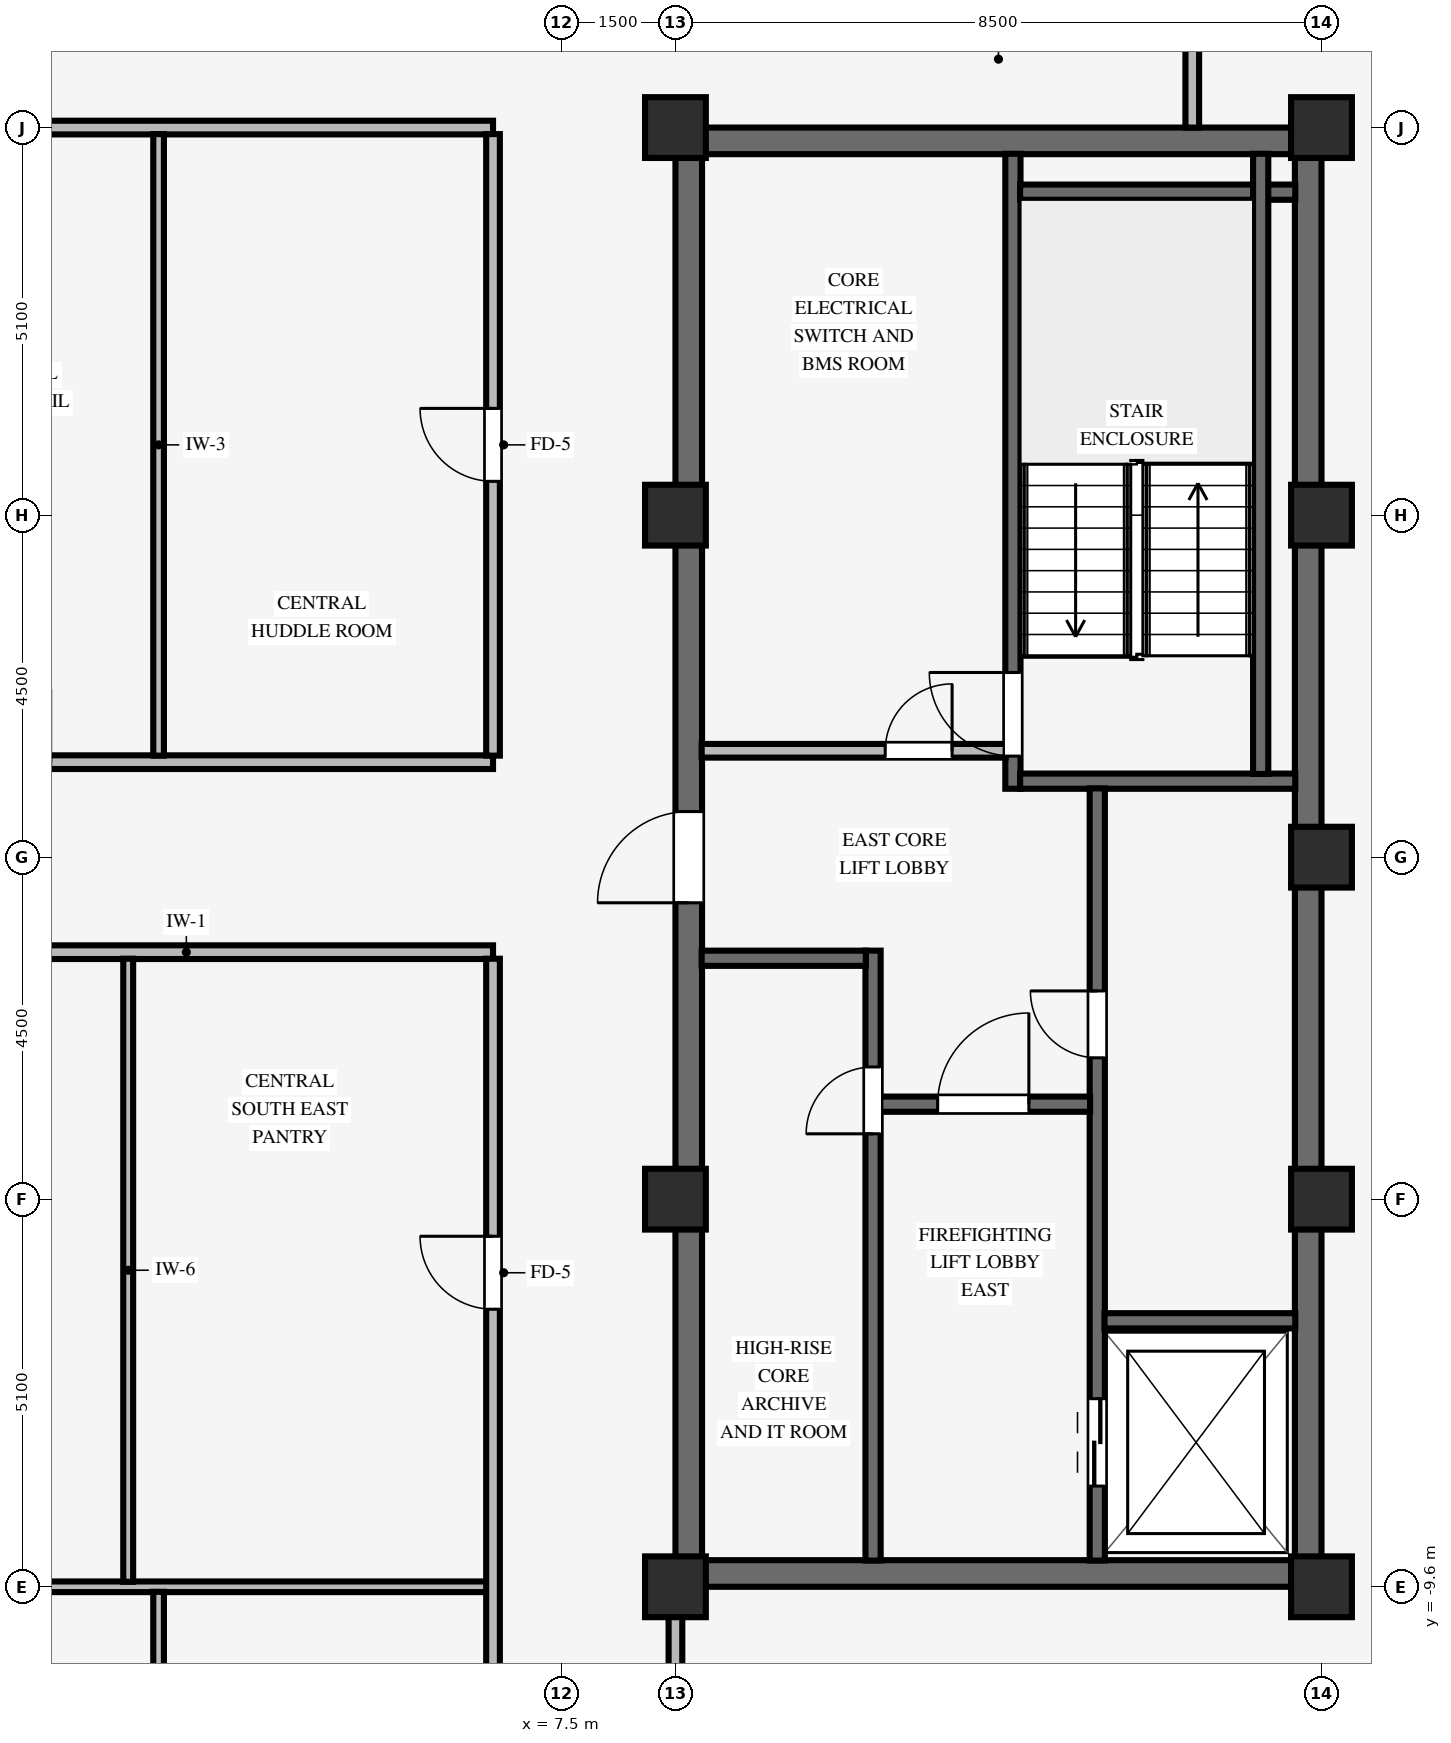
"""IFC4 building model, lengths in metres.
Left out: names, types, materials, properties, quantities, classifications, styles, units other than length and angle.
Written with IfcOpenShell. Run it as: python <this file> out.ifc"""

import sys

from ifc_helpers import new_model, si_unit, direction, frame, frame_2d, origin, origin_2d, place, context, subcontext, project, spatial, rectangle, extrude, source, transform, mapped, element, fill, save


model = new_model("IFC4")
c1 = context("Model", 3, precision=1e-05, world=origin(), true_north=direction((0.0, 1.0)))
c2 = subcontext(c1, "Body", "Model", "MODEL_VIEW")
j1 = project(units=[si_unit("LENGTHUNIT", "METRE"), si_unit("PLANEANGLEUNIT", "RADIAN")], contexts=[c1])
p1 = place(None, origin())
s1 = spatial("IfcSite", under=j1, at=p1, CompositionType="ELEMENT")
p2 = place(p1, origin())
s2 = spatial("IfcBuilding", under=s1, at=p2, CompositionType="ELEMENT")
p3 = place(p2, frame((0.0, 0.0, 272.55)))
s3 = spatial("IfcBuildingStorey", under=s2, at=p3, CompositionType="ELEMENT", Elevation=272.55)
for number, where, z_axis, x_axis in (
    (1, (9.0, -9.425, 0.0), (0.0, 0.0, 1.0), (1.0, 0.0, 0.0)),
    (2, (9.0, 9.425, 0.0), (0.0, 0.0, 1.0), (1.0, 0.0, 0.0)),
):
    element("IfcWall", number, at=place(p3, frame(where, z_axis=z_axis, x_axis=x_axis)), inside=s3, PredefinedType="SHEAR", context=c2, shape_type="SweptSolid", body=[
        extrude(rectangle(XDim=8.5, YDim=0.35, at=frame_2d((4.25, 0.0))), origin(), (0.0, 0.0, 1.0), 3.37),
    ])
p4 = place(p3, frame((9.175, -9.255, 0.0), z_axis=(0.0, 0.0, 1.0), x_axis=(0.0, 1.0, 0.0)))
e3 = element("IfcWall", 3, at=p4, inside=s3, PredefinedType="SHEAR", context=c2, shape_type="SweptSolid", body=[
    extrude(rectangle(XDim=18.51, YDim=0.35, at=frame_2d((9.255, 0.0))), origin(), (0.0, 0.0, 1.0), 3.37),
])
p5 = place(p4, frame((8.655, 0.0, 0.0)))
e4 = element("IfcOpeningElement", 4, at=p5, cuts=e3, PredefinedType="OPENING", context=c2, shape_type="SweptSolid", body=[
    extrude(rectangle(XDim=1.2, YDim=2.15, at=frame_2d((0.6, 1.075))), frame((0.0, 0.185, 0.0), z_axis=(0.0, -1.0, 0.0), x_axis=(1.0, 0.0, 0.0)), (0.0, 0.0, 1.0), 0.37),
])
p6 = place(p3, frame((17.325, -9.255, 0.0), z_axis=(0.0, 0.0, 1.0), x_axis=(0.0, 1.0, 0.0)))
e5 = element("IfcWall", 5, at=p6, inside=s3, PredefinedType="SHEAR", context=c2, shape_type="SweptSolid", body=[
    extrude(rectangle(XDim=18.51, YDim=0.35, at=frame_2d((9.255, 0.0))), origin(), (0.0, 0.0, 1.0), 3.37),
])
for number, where, z_axis, x_axis in (
    (6, (9.0, -9.6, 0.0), (0.0, 0.0, 1.0), (1.0, 0.0, 0.0)),
    (7, (9.0, -4.5, 0.0), (0.0, 0.0, 1.0), (1.0, 0.0, 0.0)),
    (8, (9.0, 4.5, 0.0), (0.0, 0.0, 1.0), (1.0, 0.0, 0.0)),
    (9, (9.0, 9.6, 0.0), (0.0, 0.0, 1.0), (1.0, 0.0, 0.0)),
    (10, (17.5, -9.6, 0.0), (0.0, 0.0, 1.0), (1.0, 0.0, 0.0)),
    (11, (17.5, -4.5, 0.0), (0.0, 0.0, 1.0), (1.0, 0.0, 0.0)),
    (12, (17.5, 4.5, 0.0), (0.0, 0.0, 1.0), (1.0, 0.0, 0.0)),
    (13, (17.5, 9.6, 0.0), (0.0, 0.0, 1.0), (1.0, 0.0, 0.0)),
    (14, (17.5, 0.0, 0.0), (0.0, 0.0, 1.0), (1.0, 0.0, 0.0)),
):
    element("IfcColumn", number, at=place(p3, frame(where, z_axis=z_axis, x_axis=x_axis)), inside=s3, PredefinedType="COLUMN", context=c2, shape_type="SweptSolid", body=[
        extrude(rectangle(XDim=0.8, YDim=0.8, at=origin_2d()), origin(), (0.0, 0.0, 1.0), 3.37),
    ])
p7 = place(p3, frame((13.44, 0.9, 0.0), z_axis=(0.0, 0.0, 1.0), x_axis=(0.0, 1.0, 0.0)))
e15 = element("IfcWall", 15, at=p7, inside=s3, PredefinedType="SHEAR", context=c2, shape_type="SweptSolid", body=[
    extrude(rectangle(XDim=8.355, YDim=0.2, at=frame_2d((4.177, 0.0))), origin(), (0.0, 0.0, 1.0), 3.37),
])
p8 = place(p7, frame((0.43, 0.0, 0.0)))
e16 = element("IfcOpeningElement", 16, at=p8, cuts=e15, PredefinedType="OPENING", context=c2, shape_type="SweptSolid", body=[
    extrude(rectangle(XDim=1.1, YDim=2.15, at=frame_2d((0.55, 1.075))), frame((0.0, 0.11, 0.0), z_axis=(0.0, -1.0, 0.0), x_axis=(1.0, 0.0, 0.0)), (0.0, 0.0, 1.0), 0.22),
])
for number, where, z_axis, x_axis in (
    (17, (13.535, 1.0, 0.0), (0.0, 0.0, 1.0), (1.0, 0.0, 0.0)),
    (18, (13.535, 8.75, 0.0), (0.0, 0.0, 1.0), (1.0, 0.0, 0.0)),
):
    element("IfcWall", number, at=place(p3, frame(where, z_axis=z_axis, x_axis=x_axis)), inside=s3, PredefinedType="SHEAR", context=c2, shape_type="SweptSolid", body=[
        extrude(rectangle(XDim=3.62, YDim=0.2, at=frame_2d((1.81, 0.0))), origin(), (0.0, 0.0, 1.0), 3.37),
    ])
p9 = place(p3, frame((16.7, 1.095, 0.0), z_axis=(0.0, 0.0, 1.0), x_axis=(0.0, 1.0, 0.0)))
e19 = element("IfcWall", 19, at=p9, inside=s3, PredefinedType="SHEAR", context=c2, shape_type="SweptSolid", body=[
    extrude(rectangle(XDim=8.16, YDim=0.2, at=frame_2d((4.08, 0.0))), origin(), (0.0, 0.0, 1.0), 3.37),
])
p10 = place(p3, frame((14.55, -9.255, 0.0), z_axis=(0.0, 0.0, 1.0), x_axis=(0.0, 1.0, 0.0)))
e20 = element("IfcWall", 20, at=p10, inside=s3, PredefinedType="SHEAR", context=c2, shape_type="SweptSolid", body=[
    extrude(rectangle(XDim=10.16, YDim=0.2, at=frame_2d((5.08, 0.0))), origin(), (0.0, 0.0, 1.0), 3.37),
])
p11 = place(p10, frame((6.615, 0.0, 0.0)))
e21 = element("IfcOpeningElement", 21, at=p11, cuts=e20, PredefinedType="OPENING", context=c2, shape_type="SweptSolid", body=[
    extrude(rectangle(XDim=0.88, YDim=2.1, at=frame_2d((0.44, 1.05))), frame((0.0, 0.11, 0.0), z_axis=(0.0, -1.0, 0.0), x_axis=(1.0, 0.0, 0.0)), (0.0, 0.0, 1.0), 0.22),
])
p12 = place(p10, frame((0.98, 0.0, 0.0)))
e22 = element("IfcOpeningElement", 22, at=p12, cuts=e20, PredefinedType="OPENING", context=c2, shape_type="SweptSolid", body=[
    extrude(rectangle(XDim=1.15, YDim=2.15, at=frame_2d((0.575, 1.075))), frame((0.0, 0.11, 0.0), z_axis=(0.0, -1.0, 0.0), x_axis=(1.0, 0.0, 0.0)), (0.0, 0.0, 1.0), 0.22),
])
p13 = place(p3, frame((14.645, -6.1, 0.0), z_axis=(0.0, 0.0, 1.0), x_axis=(1.0, 0.0, 0.0)))
e23 = element("IfcWall", 23, at=p13, inside=s3, PredefinedType="SHEAR", context=c2, shape_type="SweptSolid", body=[
    extrude(rectangle(XDim=2.51, YDim=0.2, at=frame_2d((1.255, 0.0))), origin(), (0.0, 0.0, 1.0), 3.37),
])
p14 = place(p3, frame((11.6, -9.255, 0.0), z_axis=(0.0, 0.0, 1.0), x_axis=(0.0, 1.0, 0.0)))
e24 = element("IfcWall", 24, at=p14, inside=s3, PredefinedType="SHEAR", context=c2, shape_type="SweptSolid", body=[
    extrude(rectangle(XDim=8.025, YDim=0.2, at=frame_2d((4.012, 0.0))), origin(), (0.0, 0.0, 1.0), 3.37),
])
p15 = place(p14, frame((5.615, 0.0, 0.0)))
e25 = element("IfcOpeningElement", 25, at=p15, cuts=e24, PredefinedType="OPENING", context=c2, shape_type="SweptSolid", body=[
    extrude(rectangle(XDim=0.88, YDim=2.1, at=frame_2d((0.44, 1.05))), frame((0.0, 0.11, 0.0), z_axis=(0.0, -1.0, 0.0), x_axis=(1.0, 0.0, 0.0)), (0.0, 0.0, 1.0), 0.22),
])
p16 = place(p3, frame((11.695, -3.25, 0.0), z_axis=(0.0, 0.0, 1.0), x_axis=(1.0, 0.0, 0.0)))
e26 = element("IfcWall", 26, at=p16, inside=s3, PredefinedType="SHEAR", context=c2, shape_type="SweptSolid", body=[
    extrude(rectangle(XDim=2.76, YDim=0.2, at=frame_2d((1.38, 0.0))), origin(), (0.0, 0.0, 1.0), 3.37),
])
p17 = place(p16, frame((0.755, 0.0, 0.0)))
e27 = element("IfcOpeningElement", 27, at=p17, cuts=e26, PredefinedType="OPENING", context=c2, shape_type="SweptSolid", body=[
    extrude(rectangle(XDim=1.2, YDim=2.15, at=frame_2d((0.6, 1.075))), frame((0.0, 0.11, 0.0), z_axis=(0.0, -1.0, 0.0), x_axis=(1.0, 0.0, 0.0)), (0.0, 0.0, 1.0), 0.22),
])
p18 = place(p3, frame((9.345, -1.33, 0.0), z_axis=(0.0, 0.0, 1.0), x_axis=(1.0, 0.0, 0.0)))
e28 = element("IfcWall", 28, at=p18, inside=s3, PredefinedType="SHEAR", context=c2, shape_type="SweptSolid", body=[
    extrude(rectangle(XDim=2.16, YDim=0.2, at=frame_2d((1.08, 0.0))), origin(), (0.0, 0.0, 1.0), 3.37),
])
p19 = place(p3, frame((9.345, 1.4, 0.0), z_axis=(0.0, 0.0, 1.0), x_axis=(1.0, 0.0, 0.0)))
e29 = element("IfcWall", 29, at=p19, inside=s3, PredefinedType="PARTITIONING", context=c2, shape_type="SweptSolid", body=[
    extrude(rectangle(XDim=4.0, YDim=0.18, at=frame_2d((2.0, 0.0))), origin(), (0.0, 0.0, 1.0), 3.36),
])
p20 = place(p19, frame((2.415, 0.0, 0.0)))
e30 = element("IfcOpeningElement", 30, at=p20, cuts=e29, PredefinedType="OPENING", context=c2, shape_type="SweptSolid", body=[
    extrude(rectangle(XDim=0.88, YDim=2.1, at=frame_2d((0.44, 1.05))), frame((0.0, 0.1, 0.0), z_axis=(0.0, -1.0, 0.0), x_axis=(1.0, 0.0, 0.0)), (0.0, 0.0, 1.0), 0.2),
])
p21 = place(p3, frame((0.151, -9.6, 0.0), z_axis=(0.0, 0.0, 1.0), x_axis=(1.0, 0.0, 0.0)))
e31 = element("IfcWall", 31, at=p21, inside=s3, PredefinedType="PARTITIONING", context=c2, shape_type="SweptSolid", body=[
    extrude(rectangle(XDim=6.388, YDim=0.14, at=frame_2d((3.194, 0.0))), origin(), (0.0, 0.0, 1.0), 2.405),
])
p22 = place(p3, frame((-6.6, -1.25, 0.0), z_axis=(0.0, 0.0, 1.0), x_axis=(1.0, 0.0, 0.0)))
e32 = element("IfcWall", 32, at=p22, inside=s3, PredefinedType="PARTITIONING", context=c2, shape_type="SweptSolid", body=[
    extrude(rectangle(XDim=13.2, YDim=0.18, at=frame_2d((6.6, 0.0))), origin(), (0.0, 0.0, 1.0), 3.36),
])
p23 = place(p22, frame((3.72, 0.0, 0.0)))
e33 = element("IfcOpeningElement", 33, at=p23, cuts=e32, PredefinedType="OPENING", context=c2, shape_type="SweptSolid", body=[
    extrude(rectangle(XDim=0.96, YDim=2.1, at=frame_2d((0.48, 1.05))), frame((0.0, 0.1, 0.0), z_axis=(0.0, -1.0, 0.0), x_axis=(1.0, 0.0, 0.0)), (0.0, 0.0, 1.0), 0.2),
])
p24 = place(p3, frame((-6.6, 1.25, 0.0), z_axis=(0.0, 0.0, 1.0), x_axis=(1.0, 0.0, 0.0)))
e34 = element("IfcWall", 34, at=p24, inside=s3, PredefinedType="PARTITIONING", context=c2, shape_type="SweptSolid", body=[
    extrude(rectangle(XDim=13.2, YDim=0.18, at=frame_2d((6.6, 0.0))), origin(), (0.0, 0.0, 1.0), 3.36),
])
p25 = place(p24, frame((6.42, 0.0, 0.0)))
e35 = element("IfcOpeningElement", 35, at=p25, cuts=e34, PredefinedType="OPENING", context=c2, shape_type="SweptSolid", body=[
    extrude(rectangle(XDim=0.96, YDim=2.1, at=frame_2d((0.48, 1.05))), frame((0.0, 0.1, 0.0), z_axis=(0.0, -1.0, 0.0), x_axis=(1.0, 0.0, 0.0)), (0.0, 0.0, 1.0), 0.2),
])
p26 = place(p3, frame((0.151, 9.6, 0.0), z_axis=(0.0, 0.0, 1.0), x_axis=(1.0, 0.0, 0.0)))
e36 = element("IfcWall", 36, at=p26, inside=s3, PredefinedType="PARTITIONING", context=c2, shape_type="SweptSolid", body=[
    extrude(rectangle(XDim=6.449, YDim=0.18, at=frame_2d((3.225, 0.0))), origin(), (0.0, 0.0, 1.0), 2.405),
])
p27 = place(p3, frame((1.8, -9.534, 0.0), z_axis=(0.0, 0.0, 1.0), x_axis=(0.0, 1.0, 0.0)))
e37 = element("IfcWall", 37, at=p27, inside=s3, PredefinedType="PARTITIONING", context=c2, shape_type="SweptSolid", body=[
    extrude(rectangle(XDim=8.198, YDim=0.13, at=frame_2d((4.099, 0.0))), origin(), (0.0, 0.0, 1.0), 3.36),
])
p28 = place(p3, frame((2.2, -19.1, 0.0), z_axis=(0.0, 0.0, 1.0), x_axis=(0.0, 1.0, 0.0)))
e38 = element("IfcWall", 38, at=p28, inside=s3, PredefinedType="PARTITIONING", context=c2, shape_type="SweptSolid", body=[
    extrude(rectangle(XDim=9.434, YDim=0.14, at=frame_2d((4.717, 0.0))), origin(), (0.0, 0.0, 1.0), 3.36),
])
p29 = place(p28, frame((4.247, 0.0, 0.0)))
e39 = element("IfcOpeningElement", 39, at=p29, cuts=e38, PredefinedType="OPENING", context=c2, shape_type="SweptSolid", body=[
    extrude(rectangle(XDim=0.94, YDim=2.1, at=frame_2d((0.47, 1.05))), frame((0.0, 0.08, 0.0), z_axis=(0.0, -1.0, 0.0), x_axis=(1.0, 0.0, 0.0)), (0.0, 0.0, 1.0), 0.16),
])
p30 = place(p3, frame((2.2, 1.336, 0.0), z_axis=(0.0, 0.0, 1.0), x_axis=(0.0, 1.0, 0.0)))
e40 = element("IfcWall", 40, at=p30, inside=s3, PredefinedType="PARTITIONING", context=c2, shape_type="SweptSolid", body=[
    extrude(rectangle(XDim=8.178, YDim=0.14, at=frame_2d((4.089, 0.0))), origin(), (0.0, 0.0, 1.0), 3.36),
])
p31 = place(p3, frame((6.6, -19.1, 0.0), z_axis=(0.0, 0.0, 1.0), x_axis=(0.0, 1.0, 0.0)))
e41 = element("IfcWall", 41, at=p31, inside=s3, PredefinedType="PARTITIONING", context=c2, shape_type="SweptSolid", body=[
    extrude(rectangle(XDim=17.764, YDim=0.18, at=frame_2d((8.882, 0.0))), origin(), (0.0, 0.0, 1.0), 3.36),
])
p32 = place(p31, frame((13.152, 0.0, 0.0)))
e42 = element("IfcOpeningElement", 42, at=p32, cuts=e41, PredefinedType="OPENING", context=c2, shape_type="SweptSolid", body=[
    extrude(rectangle(XDim=0.96, YDim=2.1, at=frame_2d((0.48, 1.05))), frame((0.0, 0.1, 0.0), z_axis=(0.0, -1.0, 0.0), x_axis=(1.0, 0.0, 0.0)), (0.0, 0.0, 1.0), 0.2),
])
p33 = place(p31, frame((6.12, 0.0, 0.0)))
e43 = element("IfcOpeningElement", 43, at=p33, cuts=e41, PredefinedType="OPENING", context=c2, shape_type="SweptSolid", body=[
    extrude(rectangle(XDim=0.96, YDim=2.1, at=frame_2d((0.48, 1.05))), frame((0.0, 0.1, 0.0), z_axis=(0.0, -1.0, 0.0), x_axis=(1.0, 0.0, 0.0)), (0.0, 0.0, 1.0), 0.2),
])
p34 = place(p3, frame((6.6, 1.336, 0.0), z_axis=(0.0, 0.0, 1.0), x_axis=(0.0, 1.0, 0.0)))
e44 = element("IfcWall", 44, at=p34, inside=s3, PredefinedType="PARTITIONING", context=c2, shape_type="SweptSolid", body=[
    extrude(rectangle(XDim=8.178, YDim=0.18, at=frame_2d((4.089, 0.0))), origin(), (0.0, 0.0, 1.0), 3.36),
])
p35 = place(p34, frame((3.609, 0.0, 0.0)))
e45 = element("IfcOpeningElement", 45, at=p35, cuts=e44, PredefinedType="OPENING", context=c2, shape_type="SweptSolid", body=[
    extrude(rectangle(XDim=0.96, YDim=2.1, at=frame_2d((0.48, 1.05))), frame((0.0, 0.1, 0.0), z_axis=(0.0, -1.0, 0.0), x_axis=(1.0, 0.0, 0.0)), (0.0, 0.0, 1.0), 0.2),
])
p36 = place(p3, frame((9.0, -15.314, 0.0), z_axis=(0.0, 0.0, 1.0), x_axis=(0.0, 1.0, 0.0)))
e46 = element("IfcWall", 46, at=p36, inside=s3, PredefinedType="PARTITIONING", context=c2, shape_type="SweptSolid", body=[
    extrude(rectangle(XDim=5.318, YDim=0.18, at=frame_2d((2.659, 0.0))), origin(), (0.0, 0.0, 1.0), 2.892),
])
p37 = place(p36, frame((2.179, 0.0, 0.0)))
e47 = element("IfcOpeningElement", 47, at=p37, cuts=e46, PredefinedType="OPENING", context=c2, shape_type="SweptSolid", body=[
    extrude(rectangle(XDim=0.96, YDim=2.1, at=frame_2d((0.48, 1.05))), frame((0.0, 0.1, 0.0), z_axis=(0.0, -1.0, 0.0), x_axis=(1.0, 0.0, 0.0)), (0.0, 0.0, 1.0), 0.2),
])
p38 = place(p3, frame((15.8, 9.6, 0.0), z_axis=(0.0, 0.0, 1.0), x_axis=(0.0, 1.0, 0.0)))
e48 = element("IfcWall", 48, at=p38, inside=s3, PredefinedType="PARTITIONING", context=c2, shape_type="SweptSolid", body=[
    extrude(rectangle(XDim=2.514, YDim=0.18, at=frame_2d((1.257, 0.0))), origin(), (0.0, 0.0, 1.0), 3.36),
])
m1 = source(origin(), c2, "Body", "SweptSolid", [
    extrude(rectangle(XDim=1.1, YDim=2.15, at=frame_2d((0.55, 1.075))), frame((0.0, 0.025, 0.0), z_axis=(0.0, -1.0, 0.0), x_axis=(1.0, 0.0, 0.0)), (0.0, 0.0, 1.0), 0.05),
])
p39 = place(p8, origin())
e49 = element("IfcDoor", 49, at=p39, inside=s3, OperationType="SINGLE_SWING_RIGHT", PredefinedType="DOOR", context=c2, shape_type="MappedRepresentation", body=[
    mapped(m1, transform((0.0, 0.0, 0.0), scale=1.0)),
])
fill(e16, e49)
m2 = source(origin(), c2, "Body", "SweptSolid", [
    extrude(rectangle(XDim=0.88, YDim=2.1, at=frame_2d((0.44, 1.05))), frame((0.0, 0.025, 0.0), z_axis=(0.0, -1.0, 0.0), x_axis=(1.0, 0.0, 0.0)), (0.0, 0.0, 1.0), 0.05),
])
p40 = place(p11, origin())
e50 = element("IfcDoor", 50, at=p40, inside=s3, OperationType="SINGLE_SWING_RIGHT", PredefinedType="DOOR", context=c2, shape_type="MappedRepresentation", body=[
    mapped(m2, transform((0.0, 0.0, 0.0), scale=1.0)),
])
fill(e21, e50)
m3 = source(origin(), c2, "Body", "SweptSolid", [
    extrude(rectangle(XDim=1.2, YDim=2.15, at=frame_2d((0.6, 1.075))), frame((0.0, 0.025, 0.0), z_axis=(0.0, -1.0, 0.0), x_axis=(1.0, 0.0, 0.0)), (0.0, 0.0, 1.0), 0.05),
])
p41 = place(p17, origin())
e51 = element("IfcDoor", 51, at=p41, inside=s3, OperationType="SINGLE_SWING_RIGHT", PredefinedType="DOOR", context=c2, shape_type="MappedRepresentation", body=[
    mapped(m3, transform((0.0, 0.0, 0.0), scale=1.0)),
])
fill(e27, e51)
p42 = place(p15, origin())
e52 = element("IfcDoor", 52, at=p42, inside=s3, OperationType="SINGLE_SWING_LEFT", PredefinedType="DOOR", context=c2, shape_type="MappedRepresentation", body=[
    mapped(m2, transform((0.0, 0.0, 0.0), scale=1.0)),
])
fill(e25, e52)
p43 = place(p5, origin())
e53 = element("IfcDoor", 53, at=p43, inside=s3, OperationType="SINGLE_SWING_LEFT", PredefinedType="DOOR", context=c2, shape_type="MappedRepresentation", body=[
    mapped(m3, transform((0.0, 0.0, 0.0), scale=1.0)),
])
fill(e4, e53)
p44 = place(p20, origin())
e54 = element("IfcDoor", 54, at=p44, inside=s3, OperationType="SINGLE_SWING_RIGHT", PredefinedType="DOOR", context=c2, shape_type="MappedRepresentation", body=[
    mapped(m2, transform((0.0, 0.0, 0.0), scale=1.0)),
])
fill(e30, e54)
m4 = source(origin(), c2, "Body", "SweptSolid", [
    extrude(rectangle(XDim=1.15, YDim=2.15, at=frame_2d((0.575, 1.075))), frame((0.0, 0.025, 0.0), z_axis=(0.0, -1.0, 0.0), x_axis=(1.0, 0.0, 0.0)), (0.0, 0.0, 1.0), 0.05),
])
p45 = place(p12, origin())
e55 = element("IfcDoor", 55, at=p45, inside=s3, OperationType="DOUBLE_DOOR_SLIDING", PredefinedType="DOOR", context=c2, shape_type="MappedRepresentation", body=[
    mapped(m4, transform((0.0, 0.0, 0.0), scale=1.0)),
])
fill(e22, e55)
m5 = source(origin(), c2, "Body", "SweptSolid", [
    extrude(rectangle(XDim=0.96, YDim=2.1, at=frame_2d((0.48, 1.05))), frame((0.0, 0.025, 0.0), z_axis=(0.0, -1.0, 0.0), x_axis=(1.0, 0.0, 0.0)), (0.0, 0.0, 1.0), 0.05),
])
p46 = place(p32, origin())
e56 = element("IfcDoor", 56, at=p46, inside=s3, OperationType="SINGLE_SWING_RIGHT", PredefinedType="DOOR", context=c2, shape_type="MappedRepresentation", body=[
    mapped(m5, transform((0.0, 0.0, 0.0), scale=1.0)),
])
fill(e42, e56)
p47 = place(p35, origin())
e57 = element("IfcDoor", 57, at=p47, inside=s3, OperationType="SINGLE_SWING_RIGHT", PredefinedType="DOOR", context=c2, shape_type="MappedRepresentation", body=[
    mapped(m5, transform((0.0, 0.0, 0.0), scale=1.0)),
])
fill(e45, e57)
save(model, sys.argv[1])
